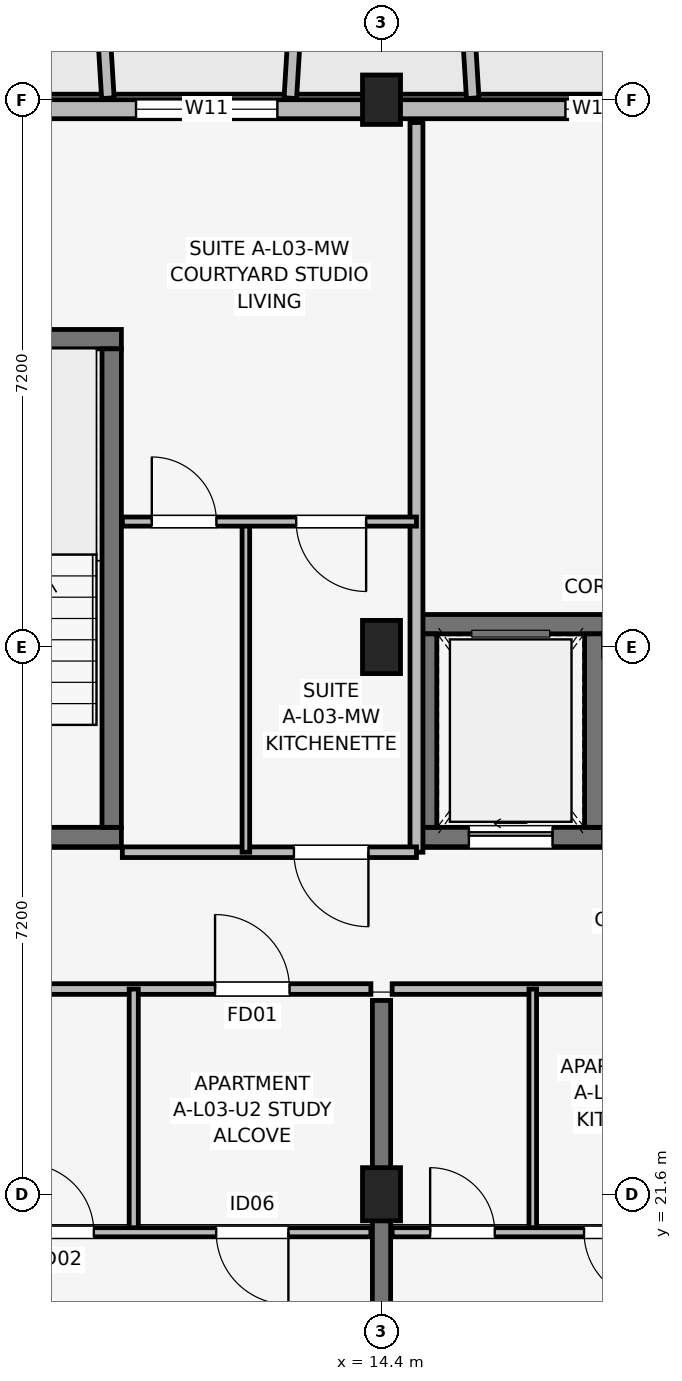
"""IFC4 building model, lengths in metres.
Left out: names, types, materials, properties, quantities, classifications, styles, units other than length and angle.
Written with IfcOpenShell. Run it as: python <this file> out.ifc"""

import sys

from ifc_helpers import new_model, si_unit, direction, frame, frame_2d, origin, origin_2d, place, context, subcontext, project, spatial, rectangle, extrude, element, fill, save


model = new_model("IFC4")
c1 = context("Model", 3, precision=1e-05, world=origin(), true_north=direction((0.0, 1.0)))
c2 = subcontext(c1, "Body", "Model", "MODEL_VIEW")
j1 = project(units=[si_unit("LENGTHUNIT", "METRE"), si_unit("PLANEANGLEUNIT", "RADIAN")], contexts=[c1])
p1 = place(None, origin())
s1 = spatial("IfcSite", under=j1, at=p1, CompositionType="ELEMENT")
p2 = place(p1, origin())
s2 = spatial("IfcBuilding", under=s1, at=p2, CompositionType="ELEMENT")
p3 = place(p2, frame((0.0, 0.0, 11.85)))
s3 = spatial("IfcBuildingStorey", under=s2, at=p3, CompositionType="ELEMENT", Elevation=11.85)
for number, where, z_axis, x_axis in (
    (1, (14.4, 21.6, 0.0), (0.0, 0.0, 1.0), (1.0, 0.0, 0.0)),
    (2, (14.4, 28.8, 0.0), (0.0, 0.0, 1.0), (1.0, 0.0, 0.0)),
):
    element("IfcColumn", number, at=place(p3, frame(where, z_axis=z_axis, x_axis=x_axis)), inside=s3, PredefinedType="COLUMN", context=c2, shape_type="SweptSolid", body=[
        extrude(rectangle(XDim=0.5, YDim=0.7, at=origin_2d()), origin(), (0.0, 0.0, 1.0), 3.15),
    ])
p4 = place(p3, frame((14.4, 36.0, 0.0), z_axis=(0.0, 0.0, 1.0), x_axis=(1.0, 0.0, 0.0)))
e3 = element("IfcColumn", 3, at=p4, inside=s3, PredefinedType="COLUMN", context=c2, shape_type="SweptSolid", body=[
    extrude(rectangle(XDim=0.5, YDim=0.65, at=origin_2d()), origin(), (0.0, 0.0, 1.0), 3.15),
])
p5 = place(p3, frame((7.673, 26.3, 0.0), z_axis=(0.0, 0.0, 1.0), x_axis=(1.0, 0.0, 0.0)))
e4 = element("IfcWall", 4, at=p5, inside=s3, PredefinedType="SHEAR", context=c2, shape_type="SweptSolid", body=[
    extrude(rectangle(XDim=3.305, YDim=0.255, at=frame_2d((1.652, 0.0))), origin(), (0.0, 0.0, 1.0), 3.15),
])
p6 = place(p5, frame((2.177, 0.0, 0.0), z_axis=(0.0, 0.0, 1.0), x_axis=(-1.0, 0.0, 0.0)))
e5 = element("IfcOpeningElement", 5, at=p6, cuts=e4, PredefinedType="OPENING", context=c2, shape_type="SweptSolid", body=[
    extrude(rectangle(XDim=1.05, YDim=2.12, at=frame_2d((0.525, 1.06))), frame((0.0, 0.137, 0.0), z_axis=(0.0, -1.0, 0.0), x_axis=(1.0, 0.0, 0.0)), (0.0, 0.0, 1.0), 0.275),
])
p7 = place(p3, frame((7.673, 32.85, 0.0), z_axis=(0.0, 0.0, 1.0), x_axis=(1.0, 0.0, 0.0)))
e6 = element("IfcWall", 6, at=p7, inside=s3, PredefinedType="SHEAR", context=c2, shape_type="SweptSolid", body=[
    extrude(rectangle(XDim=3.305, YDim=0.255, at=frame_2d((1.652, 0.0))), origin(), (0.0, 0.0, 1.0), 3.15),
])
p8 = place(p3, frame((10.85, 26.427, 0.0), z_axis=(0.0, 0.0, 1.0), x_axis=(0.0, 1.0, 0.0)))
e7 = element("IfcWall", 7, at=p8, inside=s3, PredefinedType="SHEAR", context=c2, shape_type="SweptSolid", body=[
    extrude(rectangle(XDim=6.295, YDim=0.255, at=frame_2d((3.147, 0.0))), origin(), (0.0, 0.0, 1.0), 3.15),
])
p9 = place(p3, frame((14.873, 26.3, 0.0), z_axis=(0.0, 0.0, 1.0), x_axis=(1.0, 0.0, 0.0)))
e8 = element("IfcWall", 8, at=p9, inside=s3, PredefinedType="SHEAR", context=c2, shape_type="SweptSolid", body=[
    extrude(rectangle(XDim=2.455, YDim=0.255, at=frame_2d((1.228, 0.0))), origin(), (0.0, 0.0, 1.0), 3.15),
])
p10 = place(p9, frame((0.677, 0.0, 0.0)))
e9 = element("IfcOpeningElement", 9, at=p10, cuts=e8, PredefinedType="OPENING", context=c2, shape_type="SweptSolid", body=[
    extrude(rectangle(XDim=1.1, YDim=2.15, at=frame_2d((0.55, 1.075))), frame((0.0, 0.137, 0.0), z_axis=(0.0, -1.0, 0.0), x_axis=(1.0, 0.0, 0.0)), (0.0, 0.0, 1.0), 0.275),
])
p11 = place(p3, frame((14.873, 29.1, 0.0), z_axis=(0.0, 0.0, 1.0), x_axis=(1.0, 0.0, 0.0)))
e10 = element("IfcWall", 10, at=p11, inside=s3, PredefinedType="SHEAR", context=c2, shape_type="SweptSolid", body=[
    extrude(rectangle(XDim=2.455, YDim=0.255, at=frame_2d((1.228, 0.0))), origin(), (0.0, 0.0, 1.0), 3.15),
])
for number, where, z_axis, x_axis in (
    (11, (15.0, 26.427, 0.0), (0.0, 0.0, 1.0), (0.0, 1.0, 0.0)),
    (12, (17.2, 26.427, 0.0), (0.0, 0.0, 1.0), (0.0, 1.0, 0.0)),
):
    element("IfcWall", number, at=place(p3, frame(where, z_axis=z_axis, x_axis=x_axis)), inside=s3, PredefinedType="SHEAR", context=c2, shape_type="SweptSolid", body=[
        extrude(rectangle(XDim=2.545, YDim=0.255, at=frame_2d((1.272, 0.0))), origin(), (0.0, 0.0, 1.0), 3.15),
    ])
p12 = place(p3, frame((14.4, 14.75, 0.0), z_axis=(0.0, 0.0, 1.0), x_axis=(0.0, 1.0, 0.0)))
e13 = element("IfcWall", 13, at=p12, inside=s3, PredefinedType="SHEAR", context=c2, shape_type="SweptSolid", body=[
    extrude(rectangle(XDim=9.4, YDim=0.24, at=frame_2d((4.7, 0.0))), origin(), (0.0, 0.0, 1.0), 3.15),
])
p13 = place(p3, frame((32.6, 35.875, 0.0), z_axis=(0.0, 0.0, 1.0), x_axis=(-1.0, 0.0, 0.0)))
e14 = element("IfcWall", 14, at=p13, inside=s3, PredefinedType="SOLIDWALL", context=c2, shape_type="SweptSolid", body=[
    extrude(rectangle(XDim=29.2, YDim=0.25, at=frame_2d((14.6, 0.0))), origin(), (0.0, 0.0, 1.0), 2.43),
])
p14 = place(p13, frame((28.625, 0.0, 0.0), z_axis=(0.0, 0.0, 1.0), x_axis=(-1.0, 0.0, 0.0)))
e15 = element("IfcOpeningElement", 15, at=p14, cuts=e14, PredefinedType="OPENING", context=c2, shape_type="SweptSolid", body=[
    extrude(rectangle(XDim=1.65, YDim=2.15, at=frame_2d((0.825, 1.075))), frame((0.0, 0.135, 0.0), z_axis=(0.0, -1.0, 0.0), x_axis=(1.0, 0.0, 0.0)), (0.0, 0.0, 1.0), 0.27),
])
p15 = place(p13, frame((2.3, 0.0, 0.0), z_axis=(0.0, 0.0, 1.0), x_axis=(-1.0, 0.0, 0.0)))
e16 = element("IfcOpeningElement", 16, at=p15, cuts=e14, PredefinedType="OPENING", context=c2, shape_type="SweptSolid", body=[
    extrude(rectangle(XDim=1.8, YDim=2.15, at=frame_2d((0.9, 1.075))), frame((0.0, 0.135, 0.0), z_axis=(0.0, -1.0, 0.0), x_axis=(1.0, 0.0, 0.0)), (0.0, 0.0, 1.0), 0.27),
])
p16 = place(p13, frame((15.03, 0.0, 0.5)))
e17 = element("IfcOpeningElement", 17, at=p16, cuts=e14, PredefinedType="OPENING", context=c2, shape_type="SweptSolid", body=[
    extrude(rectangle(XDim=0.75, YDim=1.75, at=frame_2d((0.375, 0.875))), frame((0.0, 0.135, 0.0), z_axis=(0.0, -1.0, 0.0), x_axis=(1.0, 0.0, 0.0)), (0.0, 0.0, 1.0), 0.27),
])
p17 = place(p13, frame((7.675, 0.0, 0.67)))
e18 = element("IfcOpeningElement", 18, at=p17, cuts=e14, PredefinedType="OPENING", context=c2, shape_type="SweptSolid", body=[
    extrude(rectangle(XDim=2.0, YDim=1.65, at=frame_2d((1.0, 0.825))), frame((0.0, 0.135, 0.0), z_axis=(0.0, -1.0, 0.0), x_axis=(1.0, 0.0, 0.0)), (0.0, 0.0, 1.0), 0.27),
])
p18 = place(p13, frame((19.57, 0.0, 0.7)))
e19 = element("IfcOpeningElement", 19, at=p18, cuts=e14, PredefinedType="OPENING", context=c2, shape_type="SweptSolid", body=[
    extrude(rectangle(XDim=1.86, YDim=1.6, at=frame_2d((0.93, 0.8))), frame((0.0, 0.135, 0.0), z_axis=(0.0, -1.0, 0.0), x_axis=(1.0, 0.0, 0.0)), (0.0, 0.0, 1.0), 0.27),
])
for number, where, z_axis, x_axis in (
    (20, (10.8, 36.02, 0.0), (0.0, 0.0, 1.0), (-0.061, 0.998, 0.0)),
    (21, (13.2, 36.02, 0.0), (0.0, 0.0, 1.0), (0.061, 0.998, 0.0)),
):
    element("IfcWall", number, at=place(p3, frame(where, z_axis=z_axis, x_axis=x_axis)), inside=s3, PredefinedType="ELEMENTEDWALL", context=c2, shape_type="SweptSolid", body=[
        extrude(rectangle(XDim=1.964, YDim=0.165, at=frame_2d((0.982, 0.0))), origin(), (0.0, 0.0, 1.0), 2.58),
    ])
p19 = place(p3, frame((15.6, 36.02, 0.0), z_axis=(0.0, 0.0, 1.0), x_axis=(-0.061170732449, 0.998127317276, 0.0)))
e22 = element("IfcWall", 22, at=p19, inside=s3, PredefinedType="ELEMENTEDWALL", context=c2, shape_type="SweptSolid", body=[
    extrude(rectangle(XDim=1.964, YDim=0.165, at=frame_2d((0.982, 0.0))), origin(), (0.0, 0.0, 1.0), 2.45),
])
p20 = place(p3, frame((7.34, 24.3, 0.0), z_axis=(0.0, 0.0, 1.0), x_axis=(1.0, 0.0, 0.0)))
e23 = element("IfcWall", 23, at=p20, inside=s3, PredefinedType="PARTITIONING", context=c2, shape_type="SweptSolid", body=[
    extrude(rectangle(XDim=6.92, YDim=0.14, at=frame_2d((3.46, 0.0))), origin(), (0.0, 0.0, 1.0), 2.38),
])
p21 = place(p20, frame((4.87, 0.0, 0.0)))
e24 = element("IfcOpeningElement", 24, at=p21, cuts=e23, PredefinedType="OPENING", context=c2, shape_type="SweptSolid", body=[
    extrude(rectangle(XDim=0.98, YDim=2.1, at=frame_2d((0.49, 1.05))), frame((0.0, 0.08, 0.0), z_axis=(0.0, -1.0, 0.0), x_axis=(1.0, 0.0, 0.0)), (0.0, 0.0, 1.0), 0.16),
])
p22 = place(p3, frame((11.14, 21.1, 0.0), z_axis=(0.0, 0.0, 1.0), x_axis=(0.0, 1.0, 0.0)))
e25 = element("IfcWall", 25, at=p22, inside=s3, PredefinedType="PARTITIONING", context=c2, shape_type="SweptSolid", body=[
    extrude(rectangle(XDim=3.2, YDim=0.12, at=frame_2d((1.6, 0.0))), origin(), (0.0, 0.0, 1.0), 2.375),
])
p23 = place(p3, frame((7.34, 21.1, 0.0), z_axis=(0.0, 0.0, 1.0), x_axis=(1.0, 0.0, 0.0)))
e26 = element("IfcWall", 26, at=p23, inside=s3, PredefinedType="PARTITIONING", context=c2, shape_type="SweptSolid", body=[
    extrude(rectangle(XDim=6.92, YDim=0.12, at=frame_2d((3.46, 0.0))), origin(), (0.0, 0.0, 1.0), 2.38),
])
p24 = place(p23, frame((1.35, 0.0, 0.0), z_axis=(0.0, 0.0, 1.0), x_axis=(-1.0, 0.0, 0.0)))
e27 = element("IfcOpeningElement", 27, at=p24, cuts=e26, PredefinedType="OPENING", context=c2, shape_type="SweptSolid", body=[
    extrude(rectangle(XDim=0.85, YDim=2.08, at=frame_2d((0.425, 1.04))), frame((0.0, 0.07, 0.0), z_axis=(0.0, -1.0, 0.0), x_axis=(1.0, 0.0, 0.0)), (0.0, 0.0, 1.0), 0.14),
])
p25 = place(p23, frame((2.375, 0.0, 0.0)))
e28 = element("IfcOpeningElement", 28, at=p25, cuts=e26, PredefinedType="OPENING", context=c2, shape_type="SweptSolid", body=[
    extrude(rectangle(XDim=0.9, YDim=2.08, at=frame_2d((0.45, 1.04))), frame((0.0, 0.07, 0.0), z_axis=(0.0, -1.0, 0.0), x_axis=(1.0, 0.0, 0.0)), (0.0, 0.0, 1.0), 0.14),
])
p26 = place(p23, frame((5.835, 0.0, 0.0), z_axis=(0.0, 0.0, 1.0), x_axis=(-1.0, 0.0, 0.0)))
e29 = element("IfcOpeningElement", 29, at=p26, cuts=e26, PredefinedType="OPENING", context=c2, shape_type="SweptSolid", body=[
    extrude(rectangle(XDim=0.95, YDim=2.08, at=frame_2d((0.475, 1.04))), frame((0.0, 0.07, 0.0), z_axis=(0.0, -1.0, 0.0), x_axis=(1.0, 0.0, 0.0)), (0.0, 0.0, 1.0), 0.14),
])
p27 = place(p3, frame((14.54, 24.3, 0.0), z_axis=(0.0, 0.0, 1.0), x_axis=(1.0, 0.0, 0.0)))
e30 = element("IfcWall", 30, at=p27, inside=s3, PredefinedType="PARTITIONING", context=c2, shape_type="SweptSolid", body=[
    extrude(rectangle(XDim=6.92, YDim=0.14, at=frame_2d((3.46, 0.0))), origin(), (0.0, 0.0, 1.0), 2.38),
])
p28 = place(p27, frame((6.0, 0.0, 0.0), z_axis=(0.0, 0.0, 1.0), x_axis=(-1.0, 0.0, 0.0)))
e31 = element("IfcOpeningElement", 31, at=p28, cuts=e30, PredefinedType="OPENING", context=c2, shape_type="SweptSolid", body=[
    extrude(rectangle(XDim=0.98, YDim=2.1, at=frame_2d((0.49, 1.05))), frame((0.0, 0.08, 0.0), z_axis=(0.0, -1.0, 0.0), x_axis=(1.0, 0.0, 0.0)), (0.0, 0.0, 1.0), 0.16),
])
p29 = place(p3, frame((16.39, 21.1, 0.0), z_axis=(0.0, 0.0, 1.0), x_axis=(0.0, 1.0, 0.0)))
e32 = element("IfcWall", 32, at=p29, inside=s3, PredefinedType="PARTITIONING", context=c2, shape_type="SweptSolid", body=[
    extrude(rectangle(XDim=3.2, YDim=0.1, at=frame_2d((1.6, 0.0))), origin(), (0.0, 0.0, 1.0), 2.375),
])
p30 = place(p3, frame((14.54, 21.1, 0.0), z_axis=(0.0, 0.0, 1.0), x_axis=(1.0, 0.0, 0.0)))
e33 = element("IfcWall", 33, at=p30, inside=s3, PredefinedType="PARTITIONING", context=c2, shape_type="SweptSolid", body=[
    extrude(rectangle(XDim=6.92, YDim=0.12, at=frame_2d((3.46, 0.0))), origin(), (0.0, 0.0, 1.0), 2.38),
])
p31 = place(p30, frame((0.5, 0.0, 0.0)))
e34 = element("IfcOpeningElement", 34, at=p31, cuts=e33, PredefinedType="OPENING", context=c2, shape_type="SweptSolid", body=[
    extrude(rectangle(XDim=0.85, YDim=2.08, at=frame_2d((0.425, 1.04))), frame((0.0, 0.07, 0.0), z_axis=(0.0, -1.0, 0.0), x_axis=(1.0, 0.0, 0.0)), (0.0, 0.0, 1.0), 0.14),
])
p32 = place(p30, frame((3.425, 0.0, 0.0), z_axis=(0.0, 0.0, 1.0), x_axis=(-1.0, 0.0, 0.0)))
e35 = element("IfcOpeningElement", 35, at=p32, cuts=e33, PredefinedType="OPENING", context=c2, shape_type="SweptSolid", body=[
    extrude(rectangle(XDim=0.9, YDim=2.08, at=frame_2d((0.45, 1.04))), frame((0.0, 0.07, 0.0), z_axis=(0.0, -1.0, 0.0), x_axis=(1.0, 0.0, 0.0)), (0.0, 0.0, 1.0), 0.14),
])
p33 = place(p30, frame((5.035, 0.0, 0.0)))
e36 = element("IfcOpeningElement", 36, at=p33, cuts=e33, PredefinedType="OPENING", context=c2, shape_type="SweptSolid", body=[
    extrude(rectangle(XDim=0.95, YDim=2.08, at=frame_2d((0.475, 1.04))), frame((0.0, 0.07, 0.0), z_axis=(0.0, -1.0, 0.0), x_axis=(1.0, 0.0, 0.0)), (0.0, 0.0, 1.0), 0.14),
])
p34 = place(p3, frame((14.86, 26.1, 0.0), z_axis=(0.0, 0.0, 1.0), x_axis=(0.0, 1.0, 0.0)))
e37 = element("IfcWall", 37, at=p34, inside=s3, PredefinedType="PARTITIONING", context=c2, shape_type="SweptSolid", body=[
    extrude(rectangle(XDim=9.6, YDim=0.17, at=frame_2d((4.8, 0.0))), origin(), (0.0, 0.0, 1.0), 2.38),
])
p35 = place(p3, frame((10.99, 26.1, 0.0), z_axis=(0.0, 0.0, 1.0), x_axis=(1.0, 0.0, 0.0)))
e38 = element("IfcWall", 38, at=p35, inside=s3, PredefinedType="PARTITIONING", context=c2, shape_type="SweptSolid", body=[
    extrude(rectangle(XDim=3.87, YDim=0.14, at=frame_2d((1.935, 0.0))), origin(), (0.0, 0.0, 1.0), 2.38),
])
p36 = place(p35, frame((3.238, 0.0, 0.0), z_axis=(0.0, 0.0, 1.0), x_axis=(-1.0, 0.0, 0.0)))
e39 = element("IfcOpeningElement", 39, at=p36, cuts=e38, PredefinedType="OPENING", context=c2, shape_type="SweptSolid", body=[
    extrude(rectangle(XDim=0.98, YDim=2.1, at=frame_2d((0.49, 1.05))), frame((0.0, 0.08, 0.0), z_axis=(0.0, -1.0, 0.0), x_axis=(1.0, 0.0, 0.0)), (0.0, 0.0, 1.0), 0.16),
])
p37 = place(p3, frame((12.615, 26.1, 0.0), z_axis=(0.0, 0.0, 1.0), x_axis=(0.0, 1.0, 0.0)))
e40 = element("IfcWall", 40, at=p37, inside=s3, PredefinedType="PARTITIONING", context=c2, shape_type="SweptSolid", body=[
    extrude(rectangle(XDim=4.35, YDim=0.1, at=frame_2d((2.175, 0.0))), origin(), (0.0, 0.0, 1.0), 2.375),
])
p38 = place(p3, frame((10.99, 30.45, 0.0), z_axis=(0.0, 0.0, 1.0), x_axis=(1.0, 0.0, 0.0)))
e41 = element("IfcWall", 41, at=p38, inside=s3, PredefinedType="PARTITIONING", context=c2, shape_type="SweptSolid", body=[
    extrude(rectangle(XDim=3.87, YDim=0.12, at=frame_2d((1.935, 0.0))), origin(), (0.0, 0.0, 1.0), 2.38),
])
p39 = place(p38, frame((0.388, 0.0, 0.0)))
e42 = element("IfcOpeningElement", 42, at=p39, cuts=e41, PredefinedType="OPENING", context=c2, shape_type="SweptSolid", body=[
    extrude(rectangle(XDim=0.85, YDim=2.08, at=frame_2d((0.425, 1.04))), frame((0.0, 0.07, 0.0), z_axis=(0.0, -1.0, 0.0), x_axis=(1.0, 0.0, 0.0)), (0.0, 0.0, 1.0), 0.14),
])
p40 = place(p38, frame((3.208, 0.0, 0.0), z_axis=(0.0, 0.0, 1.0), x_axis=(-1.0, 0.0, 0.0)))
e43 = element("IfcOpeningElement", 43, at=p40, cuts=e41, PredefinedType="OPENING", context=c2, shape_type="SweptSolid", body=[
    extrude(rectangle(XDim=0.92, YDim=2.08, at=frame_2d((0.46, 1.04))), frame((0.0, 0.07, 0.0), z_axis=(0.0, -1.0, 0.0), x_axis=(1.0, 0.0, 0.0)), (0.0, 0.0, 1.0), 0.14),
])
p41 = place(p16, origin())
e44 = element("IfcWindow", 44, at=p41, inside=s3, PartitioningType="SINGLE_PANEL", PredefinedType="WINDOW", context=c2, shape_type="SweptSolid", body=[
    extrude(rectangle(XDim=0.75, YDim=1.75, at=frame_2d((0.375, 0.875))), frame((0.0, 0.03, 0.0), z_axis=(0.0, -1.0, 0.0), x_axis=(1.0, 0.0, 0.0)), (0.0, 0.0, 1.0), 0.06),
])
fill(e17, e44)
p42 = place(p18, origin())
e45 = element("IfcWindow", 45, at=p42, inside=s3, PartitioningType="SINGLE_PANEL", PredefinedType="WINDOW", context=c2, shape_type="SweptSolid", body=[
    extrude(rectangle(XDim=1.86, YDim=1.6, at=frame_2d((0.93, 0.8))), frame((0.0, 0.03, 0.0), z_axis=(0.0, -1.0, 0.0), x_axis=(1.0, 0.0, 0.0)), (0.0, 0.0, 1.0), 0.06),
])
fill(e19, e45)
p43 = place(p21, origin())
e46 = element("IfcDoor", 46, at=p43, inside=s3, OperationType="SINGLE_SWING_LEFT", PredefinedType="DOOR", context=c2, shape_type="SweptSolid", body=[
    extrude(rectangle(XDim=0.98, YDim=2.1, at=frame_2d((0.49, 1.05))), frame((0.0, 0.025, 0.0), z_axis=(0.0, -1.0, 0.0), x_axis=(1.0, 0.0, 0.0)), (0.0, 0.0, 1.0), 0.05),
])
fill(e24, e46)
p44 = place(p25, origin())
e47 = element("IfcDoor", 47, at=p44, inside=s3, OperationType="SINGLE_SWING_LEFT", PredefinedType="DOOR", context=c2, shape_type="SweptSolid", body=[
    extrude(rectangle(XDim=0.9, YDim=2.08, at=frame_2d((0.45, 1.04))), frame((0.0, 0.025, 0.0), z_axis=(0.0, -1.0, 0.0), x_axis=(1.0, 0.0, 0.0)), (0.0, 0.0, 1.0), 0.05),
])
fill(e28, e47)
p45 = place(p26, origin())
e48 = element("IfcDoor", 48, at=p45, inside=s3, OperationType="SINGLE_SWING_RIGHT", PredefinedType="DOOR", context=c2, shape_type="SweptSolid", body=[
    extrude(rectangle(XDim=0.95, YDim=2.08, at=frame_2d((0.475, 1.04))), frame((0.0, 0.025, 0.0), z_axis=(0.0, -1.0, 0.0), x_axis=(1.0, 0.0, 0.0)), (0.0, 0.0, 1.0), 0.05),
])
fill(e29, e48)
p46 = place(p31, origin())
e49 = element("IfcDoor", 49, at=p46, inside=s3, OperationType="SINGLE_SWING_LEFT", PredefinedType="DOOR", context=c2, shape_type="SweptSolid", body=[
    extrude(rectangle(XDim=0.85, YDim=2.08, at=frame_2d((0.425, 1.04))), frame((0.0, 0.025, 0.0), z_axis=(0.0, -1.0, 0.0), x_axis=(1.0, 0.0, 0.0)), (0.0, 0.0, 1.0), 0.05),
])
fill(e34, e49)
p47 = place(p32, origin())
e50 = element("IfcDoor", 50, at=p47, inside=s3, OperationType="SINGLE_SWING_RIGHT", PredefinedType="DOOR", context=c2, shape_type="SweptSolid", body=[
    extrude(rectangle(XDim=0.9, YDim=2.08, at=frame_2d((0.45, 1.04))), frame((0.0, 0.025, 0.0), z_axis=(0.0, -1.0, 0.0), x_axis=(1.0, 0.0, 0.0)), (0.0, 0.0, 1.0), 0.05),
])
fill(e35, e50)
p48 = place(p36, origin())
e51 = element("IfcDoor", 51, at=p48, inside=s3, OperationType="SINGLE_SWING_RIGHT", PredefinedType="DOOR", context=c2, shape_type="SweptSolid", body=[
    extrude(rectangle(XDim=0.98, YDim=2.1, at=frame_2d((0.49, 1.05))), frame((0.0, 0.025, 0.0), z_axis=(0.0, -1.0, 0.0), x_axis=(1.0, 0.0, 0.0)), (0.0, 0.0, 1.0), 0.05),
])
fill(e39, e51)
p49 = place(p39, origin())
e52 = element("IfcDoor", 52, at=p49, inside=s3, OperationType="SINGLE_SWING_LEFT", PredefinedType="DOOR", context=c2, shape_type="SweptSolid", body=[
    extrude(rectangle(XDim=0.85, YDim=2.08, at=frame_2d((0.425, 1.04))), frame((0.0, 0.025, 0.0), z_axis=(0.0, -1.0, 0.0), x_axis=(1.0, 0.0, 0.0)), (0.0, 0.0, 1.0), 0.05),
])
fill(e42, e52)
p50 = place(p40, origin())
e53 = element("IfcDoor", 53, at=p50, inside=s3, OperationType="SINGLE_SWING_RIGHT", PredefinedType="DOOR", context=c2, shape_type="SweptSolid", body=[
    extrude(rectangle(XDim=0.92, YDim=2.08, at=frame_2d((0.46, 1.04))), frame((0.0, 0.025, 0.0), z_axis=(0.0, -1.0, 0.0), x_axis=(1.0, 0.0, 0.0)), (0.0, 0.0, 1.0), 0.05),
])
fill(e43, e53)
p51 = place(p10, origin())
e54 = element("IfcDoor", 54, at=p51, inside=s3, OperationType="SLIDING_TO_LEFT", PredefinedType="DOOR", context=c2, shape_type="SweptSolid", body=[
    extrude(rectangle(XDim=1.1, YDim=2.15, at=frame_2d((0.55, 1.075))), frame((0.0, 0.025, 0.0), z_axis=(0.0, -1.0, 0.0), x_axis=(1.0, 0.0, 0.0)), (0.0, 0.0, 1.0), 0.05),
])
fill(e9, e54)
save(model, sys.argv[1])
